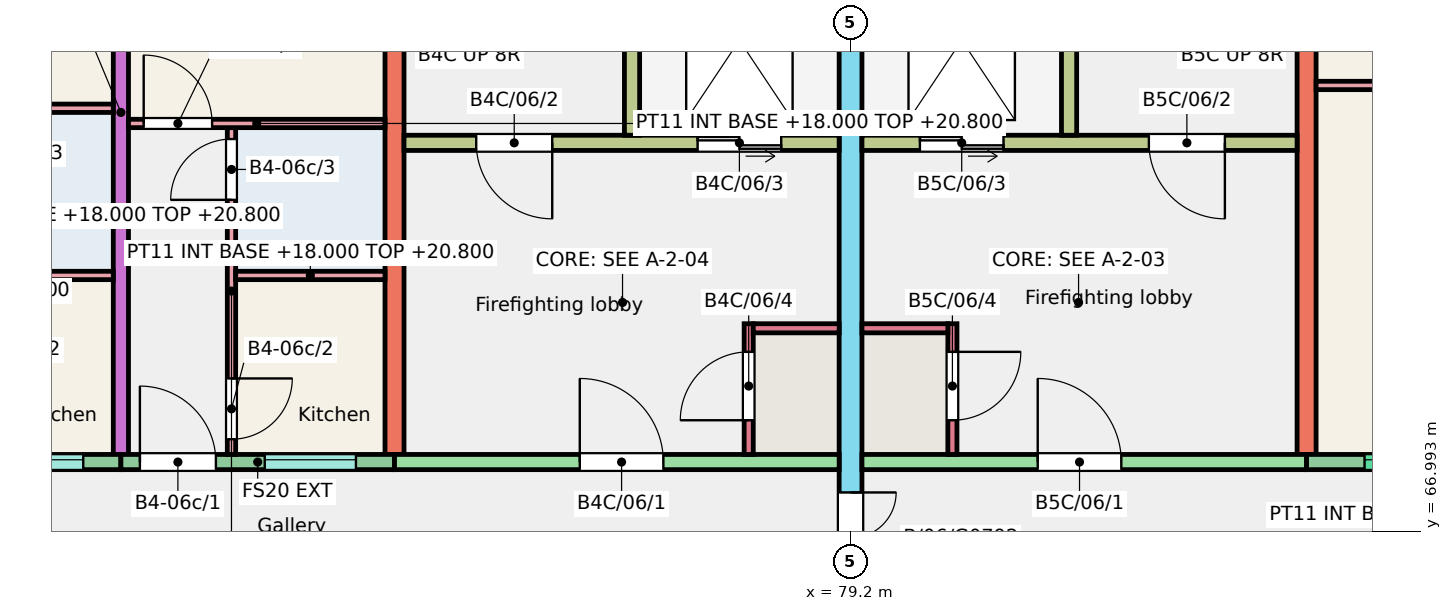
"""IFC4 building model, lengths in metres.
Left out: names, types, materials, properties, quantities, classifications, styles, units other than length and angle.
Written with IfcOpenShell. Run it as: python <this file> out.ifc"""

import sys

from ifc_helpers import new_model, si_unit, direction, frame, frame_2d, origin, place, context, subcontext, project, spatial, rectangle, extrude, element, fill, save


model = new_model("IFC4")
c1 = context("Model", 3, precision=1e-05, world=origin(), true_north=direction((0.0, 1.0)))
c2 = subcontext(c1, "Body", "Model", "MODEL_VIEW")
j1 = project(units=[si_unit("LENGTHUNIT", "METRE"), si_unit("PLANEANGLEUNIT", "RADIAN")], contexts=[c1])
p1 = place(None, origin())
s1 = spatial("IfcSite", under=j1, at=p1, CompositionType="ELEMENT")
p2 = place(p1, origin())
s2 = spatial("IfcBuilding", under=s1, at=p2, CompositionType="ELEMENT")
p3 = place(p2, frame((0.0, 0.0, 18.0)))
s3 = spatial("IfcBuildingStorey", under=s2, at=p3, CompositionType="ELEMENT", Elevation=18.0)
p4 = place(p3, frame((69.6, 68.0, 0.0), z_axis=(0.0, 0.0, 1.0), x_axis=(0.0, 1.0, 0.0)))
e1 = element("IfcWall", 1, at=p4, inside=s3, PredefinedType="SHEAR", context=c2, shape_type="SweptSolid", body=[
    extrude(rectangle(XDim=9.0, YDim=0.2, at=frame_2d((4.5, 0.0))), origin(), (0.0, 0.0, 1.0), 3.0),
])
p5 = place(p3, frame((73.2, 68.0, 0.0), z_axis=(0.0, 0.0, 1.0), x_axis=(0.0, 1.0, 0.0)))
e2 = element("IfcWall", 2, at=p5, inside=s3, PredefinedType="SHEAR", context=c2, shape_type="SweptSolid", body=[
    extrude(rectangle(XDim=9.0, YDim=0.25, at=frame_2d((4.5, 0.0))), origin(), (0.0, 0.0, 1.0), 3.0),
])
p6 = place(p3, frame((79.2, 66.0, 0.0), z_axis=(0.0, 0.0, 1.0), x_axis=(0.0, 1.0, 0.0)))
e3 = element("IfcWall", 3, at=p6, inside=s3, PredefinedType="SHEAR", context=c2, shape_type="SweptSolid", body=[
    extrude(rectangle(XDim=11.0, YDim=0.3, at=frame_2d((5.5, 0.0))), origin(), (0.0, 0.0, 1.0), 3.0),
])
p7 = place(p6, frame((0.3, 0.0, 0.0)))
e4 = element("IfcOpeningElement", 4, at=p7, cuts=e3, PredefinedType="OPENING", context=c2, shape_type="SweptSolid", body=[
    extrude(rectangle(XDim=1.2, YDim=2.1, at=frame_2d((0.6, 1.05))), frame((0.0, 0.16, 0.0), z_axis=(0.0, -1.0, 0.0), x_axis=(1.0, 0.0, 0.0)), (0.0, 0.0, 1.0), 0.32),
])
p8 = place(p3, frame((85.2, 68.0, 0.0), z_axis=(0.0, 0.0, 1.0), x_axis=(0.0, 1.0, 0.0)))
e5 = element("IfcWall", 5, at=p8, inside=s3, PredefinedType="SHEAR", context=c2, shape_type="SweptSolid", body=[
    extrude(rectangle(XDim=9.0, YDim=0.25, at=frame_2d((4.5, 0.0))), origin(), (0.0, 0.0, 1.0), 3.0),
])
p9 = place(p3, frame((66.0, 67.9, 0.0), z_axis=(0.0, 0.0, 1.0), x_axis=(1.0, 0.0, 0.0)))
e6 = element("IfcWall", 6, at=p9, inside=s3, PredefinedType="SOLIDWALL", context=c2, shape_type="SweptSolid", body=[
    extrude(rectangle(XDim=3.6, YDim=0.2, at=frame_2d((1.8, 0.0))), origin(), (0.0, 0.0, 1.0), 3.0),
])
p10 = place(p9, frame((1.905, 0.0, 1.1)))
e7 = element("IfcOpeningElement", 7, at=p10, cuts=e6, PredefinedType="OPENING", context=c2, shape_type="SweptSolid", body=[
    extrude(rectangle(XDim=1.2, YDim=1.3, at=frame_2d((0.6, 0.65))), frame((0.0, 0.11, 0.0), z_axis=(0.0, -1.0, 0.0), x_axis=(1.0, 0.0, 0.0)), (0.0, 0.0, 1.0), 0.22),
])
p11 = place(p9, frame((0.25, 0.0, 0.0)))
e8 = element("IfcOpeningElement", 8, at=p11, cuts=e6, PredefinedType="OPENING", context=c2, shape_type="SweptSolid", body=[
    extrude(rectangle(XDim=1.0, YDim=2.1, at=frame_2d((0.5, 1.05))), frame((0.0, 0.11, 0.0), z_axis=(0.0, -1.0, 0.0), x_axis=(1.0, 0.0, 0.0)), (0.0, 0.0, 1.0), 0.22),
])
p12 = place(p3, frame((69.6, 67.9, 0.0), z_axis=(0.0, 0.0, 1.0), x_axis=(1.0, 0.0, 0.0)))
e9 = element("IfcWall", 9, at=p12, inside=s3, PredefinedType="SOLIDWALL", context=c2, shape_type="SweptSolid", body=[
    extrude(rectangle(XDim=3.6, YDim=0.2, at=frame_2d((1.8, 0.0))), origin(), (0.0, 0.0, 1.0), 3.0),
])
p13 = place(p12, frame((1.893, 0.0, 1.1)))
e10 = element("IfcOpeningElement", 10, at=p13, cuts=e9, PredefinedType="OPENING", context=c2, shape_type="SweptSolid", body=[
    extrude(rectangle(XDim=1.2, YDim=1.3, at=frame_2d((0.6, 0.65))), frame((0.0, 0.11, 0.0), z_axis=(0.0, -1.0, 0.0), x_axis=(1.0, 0.0, 0.0)), (0.0, 0.0, 1.0), 0.22),
])
p14 = place(p12, frame((0.25, 0.0, 0.0)))
e11 = element("IfcOpeningElement", 11, at=p14, cuts=e9, PredefinedType="OPENING", context=c2, shape_type="SweptSolid", body=[
    extrude(rectangle(XDim=1.0, YDim=2.1, at=frame_2d((0.5, 1.05))), frame((0.0, 0.11, 0.0), z_axis=(0.0, -1.0, 0.0), x_axis=(1.0, 0.0, 0.0)), (0.0, 0.0, 1.0), 0.22),
])
p15 = place(p3, frame((73.2, 67.9, 0.0), z_axis=(0.0, 0.0, 1.0), x_axis=(1.0, 0.0, 0.0)))
e12 = element("IfcWall", 12, at=p15, inside=s3, PredefinedType="SHEAR", context=c2, shape_type="SweptSolid", body=[
    extrude(rectangle(XDim=5.85, YDim=0.2, at=frame_2d((2.925, 0.0))), origin(), (0.0, 0.0, 1.0), 3.0),
])
p16 = place(p15, frame((2.438, 0.0, 0.0)))
e13 = element("IfcOpeningElement", 13, at=p16, cuts=e12, PredefinedType="OPENING", context=c2, shape_type="SweptSolid", body=[
    extrude(rectangle(XDim=1.1, YDim=2.1, at=frame_2d((0.55, 1.05))), frame((0.0, 0.11, 0.0), z_axis=(0.0, -1.0, 0.0), x_axis=(1.0, 0.0, 0.0)), (0.0, 0.0, 1.0), 0.22),
])
p17 = place(p3, frame((73.325, 72.1, 0.0), z_axis=(0.0, 0.0, 1.0), x_axis=(1.0, 0.0, 0.0)))
e14 = element("IfcWall", 14, at=p17, inside=s3, PredefinedType="SHEAR", context=c2, shape_type="SweptSolid", body=[
    extrude(rectangle(XDim=5.725, YDim=0.2, at=frame_2d((2.863, 0.0))), origin(), (0.0, 0.0, 1.0), 3.0),
])
p18 = place(p17, frame((0.95, 0.0, 0.0)))
e15 = element("IfcOpeningElement", 15, at=p18, cuts=e14, PredefinedType="OPENING", context=c2, shape_type="SweptSolid", body=[
    extrude(rectangle(XDim=1.0, YDim=2.1, at=frame_2d((0.5, 1.05))), frame((0.0, 0.11, 0.0), z_axis=(0.0, -1.0, 0.0), x_axis=(1.0, 0.0, 0.0)), (0.0, 0.0, 1.0), 0.22),
])
p19 = place(p17, frame((3.863, 0.0, 0.0)))
e16 = element("IfcOpeningElement", 16, at=p19, cuts=e14, PredefinedType="OPENING", context=c2, shape_type="SweptSolid", body=[
    extrude(rectangle(XDim=1.1, YDim=2.1, at=frame_2d((0.55, 1.05))), frame((0.0, 0.11, 0.0), z_axis=(0.0, -1.0, 0.0), x_axis=(1.0, 0.0, 0.0)), (0.0, 0.0, 1.0), 0.22),
])
p20 = place(p3, frame((76.325, 72.2, 0.0), z_axis=(0.0, 0.0, 1.0), x_axis=(0.0, 1.0, 0.0)))
e17 = element("IfcWall", 17, at=p20, inside=s3, PredefinedType="SHEAR", context=c2, shape_type="SweptSolid", body=[
    extrude(rectangle(XDim=4.8, YDim=0.2, at=frame_2d((2.4, 0.0))), origin(), (0.0, 0.0, 1.0), 3.0),
])
p21 = place(p3, frame((77.86, 68.0, 0.0), z_axis=(0.0, 0.0, 1.0), x_axis=(0.0, 1.0, 0.0)))
e18 = element("IfcWall", 18, at=p21, inside=s3, PredefinedType="SHEAR", context=c2, shape_type="SweptSolid", body=[
    extrude(rectangle(XDim=1.72, YDim=0.12, at=frame_2d((0.86, 0.0))), origin(), (0.0, 0.0, 1.0), 3.0),
])
p22 = place(p21, frame((0.45, 0.0, 0.0)))
e19 = element("IfcOpeningElement", 19, at=p22, cuts=e18, PredefinedType="OPENING", context=c2, shape_type="SweptSolid", body=[
    extrude(rectangle(XDim=0.9, YDim=2.1, at=frame_2d((0.45, 1.05))), frame((0.0, 0.07, 0.0), z_axis=(0.0, -1.0, 0.0), x_axis=(1.0, 0.0, 0.0)), (0.0, 0.0, 1.0), 0.14),
])
p23 = place(p3, frame((77.92, 69.66, 0.0), z_axis=(0.0, 0.0, 1.0), x_axis=(1.0, 0.0, 0.0)))
e20 = element("IfcWall", 20, at=p23, inside=s3, PredefinedType="SHEAR", context=c2, shape_type="SweptSolid", body=[
    extrude(rectangle(XDim=1.13, YDim=0.12, at=frame_2d((0.565, 0.0))), origin(), (0.0, 0.0, 1.0), 3.0),
])
p24 = place(p3, frame((79.35, 67.9, 0.0), z_axis=(0.0, 0.0, 1.0), x_axis=(1.0, 0.0, 0.0)))
e21 = element("IfcWall", 21, at=p24, inside=s3, PredefinedType="SHEAR", context=c2, shape_type="SweptSolid", body=[
    extrude(rectangle(XDim=5.85, YDim=0.2, at=frame_2d((2.925, 0.0))), origin(), (0.0, 0.0, 1.0), 3.0),
])
p25 = place(p24, frame((2.312, 0.0, 0.0)))
e22 = element("IfcOpeningElement", 22, at=p25, cuts=e21, PredefinedType="OPENING", context=c2, shape_type="SweptSolid", body=[
    extrude(rectangle(XDim=1.1, YDim=2.1, at=frame_2d((0.55, 1.05))), frame((0.0, 0.11, 0.0), z_axis=(0.0, -1.0, 0.0), x_axis=(1.0, 0.0, 0.0)), (0.0, 0.0, 1.0), 0.22),
])
p26 = place(p3, frame((79.35, 72.1, 0.0), z_axis=(0.0, 0.0, 1.0), x_axis=(1.0, 0.0, 0.0)))
e23 = element("IfcWall", 23, at=p26, inside=s3, PredefinedType="SHEAR", context=c2, shape_type="SweptSolid", body=[
    extrude(rectangle(XDim=5.725, YDim=0.2, at=frame_2d((2.862, 0.0))), origin(), (0.0, 0.0, 1.0), 3.0),
])
p27 = place(p26, frame((3.775, 0.0, 0.0)))
e24 = element("IfcOpeningElement", 24, at=p27, cuts=e23, PredefinedType="OPENING", context=c2, shape_type="SweptSolid", body=[
    extrude(rectangle(XDim=1.0, YDim=2.1, at=frame_2d((0.5, 1.05))), frame((0.0, 0.11, 0.0), z_axis=(0.0, -1.0, 0.0), x_axis=(1.0, 0.0, 0.0)), (0.0, 0.0, 1.0), 0.22),
])
p28 = place(p26, frame((0.762, 0.0, 0.0)))
e25 = element("IfcOpeningElement", 25, at=p28, cuts=e23, PredefinedType="OPENING", context=c2, shape_type="SweptSolid", body=[
    extrude(rectangle(XDim=1.1, YDim=2.1, at=frame_2d((0.55, 1.05))), frame((0.0, 0.11, 0.0), z_axis=(0.0, -1.0, 0.0), x_axis=(1.0, 0.0, 0.0)), (0.0, 0.0, 1.0), 0.22),
])
p29 = place(p3, frame((82.075, 72.2, 0.0), z_axis=(0.0, 0.0, 1.0), x_axis=(0.0, 1.0, 0.0)))
e26 = element("IfcWall", 26, at=p29, inside=s3, PredefinedType="SHEAR", context=c2, shape_type="SweptSolid", body=[
    extrude(rectangle(XDim=4.8, YDim=0.2, at=frame_2d((2.4, 0.0))), origin(), (0.0, 0.0, 1.0), 3.0),
])
p30 = place(p3, frame((80.54, 68.0, 0.0), z_axis=(0.0, 0.0, 1.0), x_axis=(0.0, 1.0, 0.0)))
e27 = element("IfcWall", 27, at=p30, inside=s3, PredefinedType="SHEAR", context=c2, shape_type="SweptSolid", body=[
    extrude(rectangle(XDim=1.72, YDim=0.12, at=frame_2d((0.86, 0.0))), origin(), (0.0, 0.0, 1.0), 3.0),
])
p31 = place(p30, frame((0.45, 0.0, 0.0)))
e28 = element("IfcOpeningElement", 28, at=p31, cuts=e27, PredefinedType="OPENING", context=c2, shape_type="SweptSolid", body=[
    extrude(rectangle(XDim=0.9, YDim=2.1, at=frame_2d((0.45, 1.05))), frame((0.0, 0.07, 0.0), z_axis=(0.0, -1.0, 0.0), x_axis=(1.0, 0.0, 0.0)), (0.0, 0.0, 1.0), 0.14),
])
p32 = place(p3, frame((79.35, 69.66, 0.0), z_axis=(0.0, 0.0, 1.0), x_axis=(1.0, 0.0, 0.0)))
e29 = element("IfcWall", 29, at=p32, inside=s3, PredefinedType="SHEAR", context=c2, shape_type="SweptSolid", body=[
    extrude(rectangle(XDim=1.13, YDim=0.12, at=frame_2d((0.565, 0.0))), origin(), (0.0, 0.0, 1.0), 3.0),
])
p33 = place(p3, frame((85.2, 67.9, 0.0), z_axis=(0.0, 0.0, 1.0), x_axis=(1.0, 0.0, 0.0)))
e30 = element("IfcWall", 30, at=p33, inside=s3, PredefinedType="SOLIDWALL", context=c2, shape_type="SweptSolid", body=[
    extrude(rectangle(XDim=3.6, YDim=0.2, at=frame_2d((1.8, 0.0))), origin(), (0.0, 0.0, 1.0), 3.0),
])
p34 = place(p33, frame((0.762, 0.0, 1.2)))
e31 = element("IfcOpeningElement", 31, at=p34, cuts=e30, PredefinedType="OPENING", context=c2, shape_type="SweptSolid", body=[
    extrude(rectangle(XDim=2.1, YDim=1.2, at=frame_2d((1.05, 0.6))), frame((0.0, 0.11, 0.0), z_axis=(0.0, -1.0, 0.0), x_axis=(1.0, 0.0, 0.0)), (0.0, 0.0, 1.0), 0.22),
])
p35 = place(p3, frame((67.51, 70.355, 0.0), z_axis=(0.0, 0.0, 1.0), x_axis=(1.0, 0.0, 0.0)))
e32 = element("IfcWall", 32, at=p35, inside=s3, PredefinedType="PARTITIONING", context=c2, shape_type="SweptSolid", body=[
    extrude(rectangle(XDim=1.99, YDim=0.11, at=frame_2d((0.995, 0.0))), origin(), (0.0, 0.0, 1.0), 2.8),
])
p36 = place(p3, frame((66.1, 72.555, 0.0), z_axis=(0.0, 0.0, 1.0), x_axis=(1.0, 0.0, 0.0)))
e33 = element("IfcWall", 33, at=p36, inside=s3, PredefinedType="PARTITIONING", context=c2, shape_type="SweptSolid", body=[
    extrude(rectangle(XDim=3.4, YDim=0.11, at=frame_2d((1.7, 0.0))), origin(), (0.0, 0.0, 1.0), 2.8),
])
p37 = place(p36, frame((0.2, 0.0, 0.0)))
e34 = element("IfcOpeningElement", 34, at=p37, cuts=e33, PredefinedType="OPENING", context=c2, shape_type="SweptSolid", body=[
    extrude(rectangle(XDim=0.9, YDim=2.1, at=frame_2d((0.45, 1.05))), frame((0.0, 0.065, 0.0), z_axis=(0.0, -1.0, 0.0), x_axis=(1.0, 0.0, 0.0)), (0.0, 0.0, 1.0), 0.13),
])
p38 = place(p3, frame((71.055, 68.0, 0.0), z_axis=(0.0, 0.0, 1.0), x_axis=(0.0, 1.0, 0.0)))
e35 = element("IfcWall", 35, at=p38, inside=s3, PredefinedType="PARTITIONING", context=c2, shape_type="SweptSolid", body=[
    extrude(rectangle(XDim=4.3, YDim=0.11, at=frame_2d((2.15, 0.0))), origin(), (0.0, 0.0, 1.0), 2.8),
])
p39 = place(p38, frame((0.2, 0.0, 0.0)))
e36 = element("IfcOpeningElement", 36, at=p39, cuts=e35, PredefinedType="OPENING", context=c2, shape_type="SweptSolid", body=[
    extrude(rectangle(XDim=0.8, YDim=2.1, at=frame_2d((0.4, 1.05))), frame((0.0, 0.065, 0.0), z_axis=(0.0, -1.0, 0.0), x_axis=(1.0, 0.0, 0.0)), (0.0, 0.0, 1.0), 0.13),
])
p40 = place(p38, frame((3.35, 0.0, 0.0)))
e37 = element("IfcOpeningElement", 37, at=p40, cuts=e35, PredefinedType="OPENING", context=c2, shape_type="SweptSolid", body=[
    extrude(rectangle(XDim=0.8, YDim=2.1, at=frame_2d((0.4, 1.05))), frame((0.0, 0.065, 0.0), z_axis=(0.0, -1.0, 0.0), x_axis=(1.0, 0.0, 0.0)), (0.0, 0.0, 1.0), 0.13),
])
p41 = place(p3, frame((71.11, 70.355, 0.0), z_axis=(0.0, 0.0, 1.0), x_axis=(1.0, 0.0, 0.0)))
e38 = element("IfcWall", 38, at=p41, inside=s3, PredefinedType="PARTITIONING", context=c2, shape_type="SweptSolid", body=[
    extrude(rectangle(XDim=1.965, YDim=0.11, at=frame_2d((0.982, 0.0))), origin(), (0.0, 0.0, 1.0), 2.8),
])
p42 = place(p3, frame((69.7, 72.355, 0.0), z_axis=(0.0, 0.0, 1.0), x_axis=(1.0, 0.0, 0.0)))
e39 = element("IfcWall", 39, at=p42, inside=s3, PredefinedType="PARTITIONING", context=c2, shape_type="SweptSolid", body=[
    extrude(rectangle(XDim=3.375, YDim=0.11, at=frame_2d((1.688, 0.0))), origin(), (0.0, 0.0, 1.0), 2.8),
])
p43 = place(p42, frame((0.2, 0.0, 0.0)))
e40 = element("IfcOpeningElement", 40, at=p43, cuts=e39, PredefinedType="OPENING", context=c2, shape_type="SweptSolid", body=[
    extrude(rectangle(XDim=0.9, YDim=2.1, at=frame_2d((0.45, 1.05))), frame((0.0, 0.065, 0.0), z_axis=(0.0, -1.0, 0.0), x_axis=(1.0, 0.0, 0.0)), (0.0, 0.0, 1.0), 0.13),
])
p44 = place(p3, frame((85.325, 72.855, 0.0), z_axis=(0.0, 0.0, 1.0), x_axis=(1.0, 0.0, 0.0)))
e41 = element("IfcWall", 41, at=p44, inside=s3, PredefinedType="PARTITIONING", context=c2, shape_type="SweptSolid", body=[
    extrude(rectangle(XDim=3.375, YDim=0.11, at=frame_2d((1.688, 0.0))), origin(), (0.0, 0.0, 1.0), 2.8),
])
p45 = place(p10, origin())
e42 = element("IfcWindow", 42, at=p45, inside=s3, PartitioningType="SINGLE_PANEL", PredefinedType="WINDOW", context=c2, shape_type="SweptSolid", body=[
    extrude(rectangle(XDim=1.2, YDim=1.3, at=frame_2d((0.6, 0.65))), frame((0.0, 0.06, 0.0), z_axis=(0.0, -1.0, 0.0), x_axis=(1.0, 0.0, 0.0)), (0.0, 0.0, 1.0), 0.06),
])
fill(e7, e42)
p46 = place(p13, origin())
e43 = element("IfcWindow", 43, at=p46, inside=s3, PartitioningType="SINGLE_PANEL", PredefinedType="WINDOW", context=c2, shape_type="SweptSolid", body=[
    extrude(rectangle(XDim=1.2, YDim=1.3, at=frame_2d((0.6, 0.65))), frame((0.0, 0.06, 0.0), z_axis=(0.0, -1.0, 0.0), x_axis=(1.0, 0.0, 0.0)), (0.0, 0.0, 1.0), 0.06),
])
fill(e10, e43)
p47 = place(p34, origin())
e44 = element("IfcWindow", 44, at=p47, inside=s3, PartitioningType="SINGLE_PANEL", PredefinedType="WINDOW", context=c2, shape_type="SweptSolid", body=[
    extrude(rectangle(XDim=2.1, YDim=1.2, at=frame_2d((1.05, 0.6))), frame((0.0, 0.06, 0.0), z_axis=(0.0, -1.0, 0.0), x_axis=(1.0, 0.0, 0.0)), (0.0, 0.0, 1.0), 0.06),
])
fill(e31, e44)
p48 = place(p14, origin())
e45 = element("IfcDoor", 45, at=p48, inside=s3, OperationType="SINGLE_SWING_LEFT", PredefinedType="DOOR", context=c2, shape_type="SweptSolid", body=[
    extrude(rectangle(XDim=1.0, YDim=2.1, at=frame_2d((0.5, 1.05))), frame((0.0, 0.025, 0.0), z_axis=(0.0, -1.0, 0.0), x_axis=(1.0, 0.0, 0.0)), (0.0, 0.0, 1.0), 0.05),
])
fill(e11, e45)
p49 = place(p39, origin())
e46 = element("IfcDoor", 46, at=p49, inside=s3, OperationType="SINGLE_SWING_RIGHT", PredefinedType="DOOR", context=c2, shape_type="SweptSolid", body=[
    extrude(rectangle(XDim=0.8, YDim=2.1, at=frame_2d((0.4, 1.05))), frame((0.0, 0.025, 0.0), z_axis=(0.0, -1.0, 0.0), x_axis=(1.0, 0.0, 0.0)), (0.0, 0.0, 1.0), 0.05),
])
fill(e36, e46)
p50 = place(p40, origin())
e47 = element("IfcDoor", 47, at=p50, inside=s3, OperationType="SINGLE_SWING_LEFT", PredefinedType="DOOR", context=c2, shape_type="SweptSolid", body=[
    extrude(rectangle(XDim=0.8, YDim=2.1, at=frame_2d((0.4, 1.05))), frame((0.0, 0.025, 0.0), z_axis=(0.0, -1.0, 0.0), x_axis=(1.0, 0.0, 0.0)), (0.0, 0.0, 1.0), 0.05),
])
fill(e37, e47)
p51 = place(p43, origin())
e48 = element("IfcDoor", 48, at=p51, inside=s3, OperationType="SINGLE_SWING_LEFT", PredefinedType="DOOR", context=c2, shape_type="SweptSolid", body=[
    extrude(rectangle(XDim=0.9, YDim=2.1, at=frame_2d((0.45, 1.05))), frame((0.0, 0.025, 0.0), z_axis=(0.0, -1.0, 0.0), x_axis=(1.0, 0.0, 0.0)), (0.0, 0.0, 1.0), 0.05),
])
fill(e40, e48)
p52 = place(p16, origin())
e49 = element("IfcDoor", 49, at=p52, inside=s3, OperationType="SINGLE_SWING_LEFT", PredefinedType="DOOR", context=c2, shape_type="SweptSolid", body=[
    extrude(rectangle(XDim=1.1, YDim=2.1, at=frame_2d((0.55, 1.05))), frame((0.0, 0.025, 0.0), z_axis=(0.0, -1.0, 0.0), x_axis=(1.0, 0.0, 0.0)), (0.0, 0.0, 1.0), 0.05),
])
fill(e13, e49)
p53 = place(p18, origin())
e50 = element("IfcDoor", 50, at=p53, inside=s3, OperationType="SINGLE_SWING_RIGHT", PredefinedType="DOOR", context=c2, shape_type="SweptSolid", body=[
    extrude(rectangle(XDim=1.0, YDim=2.1, at=frame_2d((0.5, 1.05))), frame((0.0, 0.025, 0.0), z_axis=(0.0, -1.0, 0.0), x_axis=(1.0, 0.0, 0.0)), (0.0, 0.0, 1.0), 0.05),
])
fill(e15, e50)
p54 = place(p19, origin())
e51 = element("IfcDoor", 51, at=p54, inside=s3, OperationType="DOUBLE_DOOR_SLIDING", PredefinedType="DOOR", context=c2, shape_type="SweptSolid", body=[
    extrude(rectangle(XDim=1.1, YDim=2.1, at=frame_2d((0.55, 1.05))), frame((0.0, 0.025, 0.0), z_axis=(0.0, -1.0, 0.0), x_axis=(1.0, 0.0, 0.0)), (0.0, 0.0, 1.0), 0.05),
])
fill(e16, e51)
p55 = place(p22, origin())
e52 = element("IfcDoor", 52, at=p55, inside=s3, OperationType="SINGLE_SWING_LEFT", PredefinedType="DOOR", context=c2, shape_type="SweptSolid", body=[
    extrude(rectangle(XDim=0.9, YDim=2.1, at=frame_2d((0.45, 1.05))), frame((0.0, 0.025, 0.0), z_axis=(0.0, -1.0, 0.0), x_axis=(1.0, 0.0, 0.0)), (0.0, 0.0, 1.0), 0.05),
])
fill(e19, e52)
p56 = place(p25, origin())
e53 = element("IfcDoor", 53, at=p56, inside=s3, OperationType="SINGLE_SWING_LEFT", PredefinedType="DOOR", context=c2, shape_type="SweptSolid", body=[
    extrude(rectangle(XDim=1.1, YDim=2.1, at=frame_2d((0.55, 1.05))), frame((0.0, 0.025, 0.0), z_axis=(0.0, -1.0, 0.0), x_axis=(1.0, 0.0, 0.0)), (0.0, 0.0, 1.0), 0.05),
])
fill(e22, e53)
p57 = place(p27, origin())
e54 = element("IfcDoor", 54, at=p57, inside=s3, OperationType="SINGLE_SWING_RIGHT", PredefinedType="DOOR", context=c2, shape_type="SweptSolid", body=[
    extrude(rectangle(XDim=1.0, YDim=2.1, at=frame_2d((0.5, 1.05))), frame((0.0, 0.025, 0.0), z_axis=(0.0, -1.0, 0.0), x_axis=(1.0, 0.0, 0.0)), (0.0, 0.0, 1.0), 0.05),
])
fill(e24, e54)
p58 = place(p28, origin())
e55 = element("IfcDoor", 55, at=p58, inside=s3, OperationType="DOUBLE_DOOR_SLIDING", PredefinedType="DOOR", context=c2, shape_type="SweptSolid", body=[
    extrude(rectangle(XDim=1.1, YDim=2.1, at=frame_2d((0.55, 1.05))), frame((0.0, 0.025, 0.0), z_axis=(0.0, -1.0, 0.0), x_axis=(1.0, 0.0, 0.0)), (0.0, 0.0, 1.0), 0.05),
])
fill(e25, e55)
p59 = place(p31, origin())
e56 = element("IfcDoor", 56, at=p59, inside=s3, OperationType="SINGLE_SWING_RIGHT", PredefinedType="DOOR", context=c2, shape_type="SweptSolid", body=[
    extrude(rectangle(XDim=0.9, YDim=2.1, at=frame_2d((0.45, 1.05))), frame((0.0, 0.025, 0.0), z_axis=(0.0, -1.0, 0.0), x_axis=(1.0, 0.0, 0.0)), (0.0, 0.0, 1.0), 0.05),
])
fill(e28, e56)
p60 = place(p7, origin())
e57 = element("IfcDoor", 57, at=p60, inside=s3, OperationType="DOUBLE_DOOR_SINGLE_SWING", PredefinedType="DOOR", context=c2, shape_type="SweptSolid", body=[
    extrude(rectangle(XDim=1.2, YDim=2.1, at=frame_2d((0.6, 1.05))), frame((0.0, 0.025, 0.0), z_axis=(0.0, -1.0, 0.0), x_axis=(1.0, 0.0, 0.0)), (0.0, 0.0, 1.0), 0.05),
])
fill(e4, e57)
save(model, sys.argv[1])
